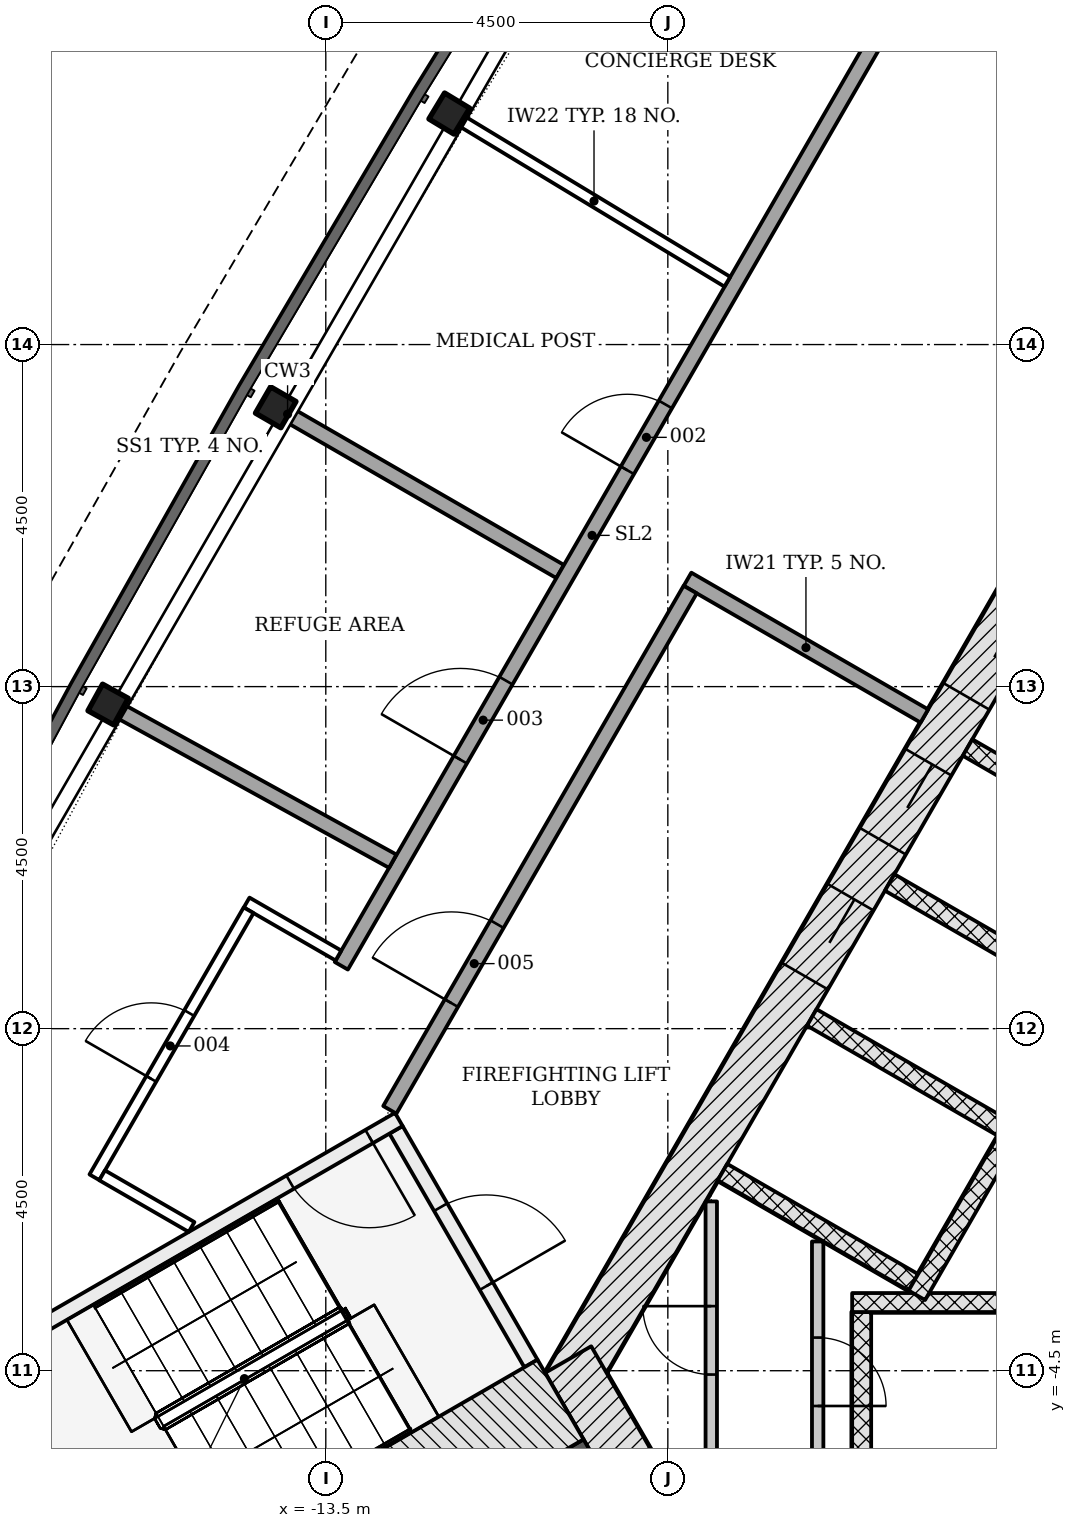
"""IFC4 building model, lengths in metres.
Left out: names, types, materials, properties, quantities, classifications, styles, units other than length and angle.
Written with IfcOpenShell. Run it as: python <this file> out.ifc"""

import sys

from ifc_helpers import new_model, si_unit, direction, frame, frame_2d, origin, origin_2d, place, context, subcontext, project, spatial, polyline, rectangle, i_section, outline, extrude, element, fill, save


model = new_model("IFC4")
c1 = context("Model", 3, precision=1e-05, world=origin(), true_north=direction((0.0, 1.0)))
c2 = subcontext(c1, "Body", "Model", "MODEL_VIEW")
j1 = project(units=[si_unit("LENGTHUNIT", "METRE"), si_unit("PLANEANGLEUNIT", "RADIAN")], contexts=[c1])
p1 = place(None, origin())
s1 = spatial("IfcSite", under=j1, at=p1, CompositionType="ELEMENT")
p2 = place(p1, origin())
s2 = spatial("IfcBuilding", under=s1, at=p2, CompositionType="ELEMENT")
p3 = place(p2, frame((0.0, 0.0, 134.7)))
s3 = spatial("IfcBuildingStorey", under=s2, at=p3, CompositionType="ELEMENT", Elevation=134.7)
p4 = place(p3, frame((-1.083, 11.281, -0.3), z_axis=(0.0, 0.0, 1.0), x_axis=(-0.500001446645, -0.866024568562, 0.0)))
e1 = element("IfcWall", 1, at=p4, inside=s3, PredefinedType="SHEAR", context=c2, shape_type="SweptSolid", body=[
    extrude(rectangle(XDim=18.458, YDim=0.7, at=frame_2d((9.229, 0.0))), origin(), (0.0, 0.0, 1.0), 5.5),
])
p5 = place(p4, frame((4.029, 0.0, 0.3)))
e2 = element("IfcOpeningElement", 2, at=p5, cuts=e1, PredefinedType="OPENING", context=c2, shape_type="SweptSolid", body=[
    extrude(rectangle(XDim=1.4, YDim=2.1, at=frame_2d((0.7, 1.05))), frame((0.0, 0.36, 0.0), z_axis=(0.0, -1.0, 0.0), x_axis=(1.0, 0.0, 0.0)), (0.0, 0.0, 1.0), 0.72),
])
p6 = place(p4, frame((6.579, 0.0, 0.3)))
e3 = element("IfcOpeningElement", 3, at=p6, cuts=e1, PredefinedType="OPENING", context=c2, shape_type="SweptSolid", body=[
    extrude(rectangle(XDim=1.4, YDim=2.1, at=frame_2d((0.7, 1.05))), frame((0.0, 0.36, 0.0), z_axis=(0.0, -1.0, 0.0), x_axis=(1.0, 0.0, 0.0)), (0.0, 0.0, 1.0), 0.72),
])
p7 = place(p4, frame((8.979, 0.0, 0.3)))
e4 = element("IfcOpeningElement", 4, at=p7, cuts=e1, PredefinedType="OPENING", context=c2, shape_type="SweptSolid", body=[
    extrude(rectangle(XDim=1.2, YDim=2.1, at=frame_2d((0.6, 1.05))), frame((0.0, 0.36, 0.0), z_axis=(0.0, -1.0, 0.0), x_axis=(1.0, 0.0, 0.0)), (0.0, 0.0, 1.0), 0.72),
])
p8 = place(p4, frame((11.029, 0.0, 0.3)))
e5 = element("IfcOpeningElement", 5, at=p8, cuts=e1, PredefinedType="OPENING", context=c2, shape_type="SweptSolid", body=[
    extrude(rectangle(XDim=1.2, YDim=2.1, at=frame_2d((0.6, 1.05))), frame((0.0, 0.36, 0.0), z_axis=(0.0, -1.0, 0.0), x_axis=(1.0, 0.0, 0.0)), (0.0, 0.0, 1.0), 0.72),
])
p9 = place(p3, frame((-10.311, -4.353, -0.3), z_axis=(0.0, 0.0, 1.0), x_axis=(0.500042739161, -0.866000726912, 0.0)))
e6 = element("IfcWall", 6, at=p9, inside=s3, PredefinedType="SHEAR", context=c2, shape_type="SweptSolid", body=[
    extrude(rectangle(XDim=2.771, YDim=0.7, at=frame_2d((1.386, 0.0))), origin(), (0.0, 0.0, 1.0), 5.5),
])
p10 = place(p3, frame((-9.922, -5.728, -0.3), z_axis=(0.0, 0.0, 1.0), x_axis=(-0.866024913782, -0.500000848707, 0.0)))
e7 = element("IfcWall", 7, at=p10, inside=s3, PredefinedType="SHEAR", context=c2, shape_type="SweptSolid", body=[
    extrude(rectangle(XDim=11.539, YDim=0.75, at=frame_2d((5.769, 0.0))), origin(), (0.0, 0.0, 1.0), 5.5),
])
for number, where, z_axis, x_axis in (
    (8, (-11.875, 12.039, -0.3), (0.0, 0.0, 1.0), (-0.517, -0.856, 0.0)),
    (9, (-14.159, 8.175, -0.3), (0.0, 0.0, 1.0), (-0.5, -0.866, 0.0)),
    (10, (-16.364, 4.265, -0.3), (0.0, 0.0, 1.0), (-0.482, -0.876, 0.0)),
):
    element("IfcColumn", number, at=place(p3, frame(where, z_axis=z_axis, x_axis=x_axis)), inside=s3, PredefinedType="COLUMN", context=c2, shape_type="SweptSolid", body=[
        extrude(i_section(OverallWidth=0.399, OverallDepth=0.386, WebThickness=0.021, FlangeThickness=0.033, FilletRadius=0.015, at=origin_2d()), origin(), (0.0, 0.0, 1.0), 5.5),
    ])
p11 = place(p3, frame((-6.45, -6.228, -0.3), z_axis=(0.0, 0.0, 1.0), x_axis=(0.0, 1.0, 0.0)))
e11 = element("IfcWall", 11, at=p11, inside=s3, PredefinedType="PARTITIONING", context=c2, shape_type="SweptSolid", body=[
    extrude(rectangle(XDim=2.5, YDim=0.25, at=frame_2d((1.25, 0.0))), origin(), (0.0, 0.0, 1.0), 5.5),
])
p12 = place(p3, frame((-6.575, -3.603, 0.0), z_axis=(0.0, 0.0, 1.0), x_axis=(1.0, 0.0, 0.0)))
e12 = element("IfcWall", 12, at=p12, inside=s3, PredefinedType="PARTITIONING", context=c2, shape_type="SweptSolid", body=[
    extrude(rectangle(XDim=13.15, YDim=0.25, at=frame_2d((6.575, 0.0))), origin(), (0.0, 0.0, 1.0), 5.2),
])
for number, where, z_axis, x_axis in (
    (13, (-5.056, 3.699, -0.3), (0.0, 0.0, 1.0), (0.866, -0.5, 0.0)),
    (14, (-6.081, 1.923, -0.3), (0.0, 0.0, 1.0), (0.866, -0.5, 0.0)),
    (15, (-7.106, 0.148, -0.3), (0.0, 0.0, 1.0), (0.866, -0.5, 0.0)),
    (16, (-8.281, -1.887, -0.3), (0.0, 0.0, 1.0), (0.866, -0.5, 0.0)),
):
    element("IfcWall", number, at=place(p3, frame(where, z_axis=z_axis, x_axis=x_axis)), inside=s3, PredefinedType="PARTITIONING", context=c2, shape_type="SweptSolid", body=[
        extrude(rectangle(XDim=2.9, YDim=0.25, at=frame_2d((1.45, 0.0))), origin(), (0.0, 0.0, 1.0), 5.5),
    ])
p13 = place(p3, frame((0.176, 6.711, 0.0), z_axis=(0.0, 0.0, 1.0), x_axis=(-0.500004227369, -0.866022963098, 0.0)))
e17 = element("IfcWall", 17, at=p13, inside=s3, PredefinedType="PARTITIONING", context=c2, shape_type="SweptSolid", body=[
    extrude(rectangle(XDim=11.8, YDim=0.25, at=frame_2d((5.9, 0.0))), origin(), (0.0, 0.0, 1.0), 5.2),
])
p14 = place(p3, frame((-8.429, -5.928, 0.0), z_axis=(0.0, 0.0, 1.0), x_axis=(0.0, 1.0, 0.0)))
e18 = element("IfcWall", 18, at=p14, inside=s3, PredefinedType="PARTITIONING", context=c2, shape_type="SweptSolid", body=[
    extrude(rectangle(XDim=3.656, YDim=0.15, at=frame_2d((1.828, 0.0))), origin(), (0.0, 0.0, 1.0), 5.2),
])
p15 = place(p14, frame((1.378, 0.0, 0.0)))
e19 = element("IfcOpeningElement", 19, at=p15, cuts=e18, PredefinedType="OPENING", context=c2, shape_type="SweptSolid", body=[
    extrude(rectangle(XDim=0.9, YDim=2.1, at=frame_2d((0.45, 1.05))), frame((0.0, 0.085, 0.0), z_axis=(0.0, -1.0, 0.0), x_axis=(1.0, 0.0, 0.0)), (0.0, 0.0, 1.0), 0.17),
])
p16 = place(p3, frame((-7.029, -2.8, 0.0), z_axis=(0.0, 0.0, 1.0), x_axis=(0.0, -1.0, 0.0)))
e20 = element("IfcWall", 20, at=p16, inside=s3, PredefinedType="PARTITIONING", context=c2, shape_type="SweptSolid", body=[
    extrude(rectangle(XDim=3.428, YDim=0.15, at=frame_2d((1.714, 0.0))), origin(), (0.0, 0.0, 1.0), 5.2),
])
p17 = place(p16, frame((1.264, 0.0, 0.0)))
e21 = element("IfcOpeningElement", 21, at=p17, cuts=e20, PredefinedType="OPENING", context=c2, shape_type="SweptSolid", body=[
    extrude(rectangle(XDim=0.9, YDim=2.1, at=frame_2d((0.45, 1.05))), frame((0.0, 0.085, 0.0), z_axis=(0.0, -1.0, 0.0), x_axis=(1.0, 0.0, 0.0)), (0.0, 0.0, 1.0), 0.17),
])
p18 = place(p3, frame((-12.576, -1.331, -0.3), z_axis=(0.0, 0.0, 1.0), x_axis=(0.499970499736, -0.8660424351, 0.0)))
e22 = element("IfcWall", 22, at=p18, inside=s3, PredefinedType="SHEAR", context=c2, shape_type="SweptSolid", body=[
    extrude(rectangle(XDim=3.55, YDim=0.2, at=frame_2d((1.775, 0.0))), origin(), (0.0, 0.0, 1.0), 5.5),
])
p19 = place(p18, frame((1.175, 0.0, 0.3)))
e23 = element("IfcOpeningElement", 23, at=p19, cuts=e22, PredefinedType="OPENING", context=c2, shape_type="SweptSolid", body=[
    extrude(rectangle(XDim=1.2, YDim=2.1, at=frame_2d((0.6, 1.05))), frame((0.0, 0.11, 0.0), z_axis=(0.0, -1.0, 0.0), x_axis=(1.0, 0.0, 0.0)), (0.0, 0.0, 1.0), 0.22),
])
p20 = place(p3, frame((-12.539, -1.194, -0.3), z_axis=(0.0, 0.0, 1.0), x_axis=(-0.866045472092, -0.499965239061, 0.0)))
e24 = element("IfcWall", 24, at=p20, inside=s3, PredefinedType="SHEAR", context=c2, shape_type="SweptSolid", body=[
    extrude(rectangle(XDim=5.6, YDim=0.2, at=frame_2d((2.8, 0.0))), origin(), (0.0, 0.0, 1.0), 5.5),
])
p21 = place(p20, frame((0.45, 0.0, 0.3)))
e25 = element("IfcOpeningElement", 25, at=p21, cuts=e24, PredefinedType="OPENING", context=c2, shape_type="SweptSolid", body=[
    extrude(rectangle(XDim=1.2, YDim=2.1, at=frame_2d((0.6, 1.05))), frame((0.0, 0.11, 0.0), z_axis=(0.0, -1.0, 0.0), x_axis=(1.0, 0.0, 0.0)), (0.0, 0.0, 1.0), 0.22),
])
p22 = place(p3, frame((-10.412, -4.879, -0.3), z_axis=(0.0, 0.0, 1.0), x_axis=(-0.866026919366, -0.499997374926, 0.0)))
e26 = element("IfcWall", 26, at=p22, inside=s3, PredefinedType="SHEAR", context=c2, shape_type="SweptSolid", body=[
    extrude(rectangle(XDim=7.2, YDim=1.211, at=frame_2d((3.6, 0.0))), origin(), (0.0, 0.0, 1.0), 5.5),
])
p23 = place(p3, frame((0.0, 0.0, -0.3)))
e27 = element("IfcWall", 27, at=p23, inside=s3, PredefinedType="SHEAR", context=c2, shape_type="SweptSolid", body=[
    extrude(outline(polyline([(-17.439, -3.907), (-18.025, -6.093), (-16.95, -7.955), (-16.777, -7.855), (-17.81, -6.065), (-17.267, -4.039), (-17.339, -4.081), (-17.339, -4.081), (-17.339, -4.081), (-17.339, -4.081), (-17.339, -4.081), (-17.339, -4.081), (-17.339, -4.081), (-17.339, -4.081), (-17.339, -4.081), (-17.339, -4.081), (-17.339, -4.081), (-17.339, -4.081), (-17.339, -4.081), (-17.339, -4.081), (-17.339, -4.081), (-17.339, -4.081), (-17.339, -4.081), (-17.439, -3.907)])), origin(), (0.0, 0.0, 1.0), 5.5),
])
p24 = place(p3, frame((-5.625, 4.114, 0.0), z_axis=(0.0, 0.0, 1.0), x_axis=(-0.866017220491, 0.500014173611, 0.0)))
e28 = element("IfcWall", 28, at=p24, inside=s3, PredefinedType="PARTITIONING", context=c2, shape_type="SweptSolid", body=[
    extrude(rectangle(XDim=3.598, YDim=0.2, at=frame_2d((1.799, 0.0))), origin(), (0.0, 0.0, 1.0), 5.2),
])
p25 = place(p3, frame((-12.658, -1.068, 0.0), z_axis=(0.0, 0.0, 1.0), x_axis=(0.499996073327, 0.866027670838, 0.0)))
e29 = element("IfcWall", 29, at=p25, inside=s3, PredefinedType="PARTITIONING", context=c2, shape_type="SweptSolid", body=[
    extrude(rectangle(XDim=7.904, YDim=0.2, at=frame_2d((3.952, 0.0))), origin(), (0.0, 0.0, 1.0), 4.647),
])
p26 = place(p25, frame((1.621, 0.0, 0.0)))
e30 = element("IfcOpeningElement", 30, at=p26, cuts=e29, PredefinedType="OPENING", context=c2, shape_type="SweptSolid", body=[
    extrude(rectangle(XDim=1.2, YDim=2.1, at=frame_2d((0.6, 1.05))), frame((0.0, 0.11, 0.0), z_axis=(0.0, -1.0, 0.0), x_axis=(1.0, 0.0, 0.0)), (0.0, 0.0, 1.0), 0.22),
])
p27 = place(p3, frame((-14.029, 8.1, 0.0), z_axis=(0.0, 0.0, 1.0), x_axis=(0.866022798998, -0.500004511595, 0.0)))
e31 = element("IfcWall", 31, at=p27, inside=s3, PredefinedType="PARTITIONING", context=c2, shape_type="SweptSolid", body=[
    extrude(rectangle(XDim=4.171, YDim=0.2, at=frame_2d((2.085, 0.0))), origin(), (0.0, 0.0, 1.0), 4.647),
])
p28 = place(p3, frame((-13.296, 0.827, 0.0), z_axis=(0.0, 0.0, 1.0), x_axis=(0.499999658466, 0.866025600969, 0.0)))
e32 = element("IfcWall", 32, at=p28, inside=s3, PredefinedType="PARTITIONING", context=c2, shape_type="SweptSolid", body=[
    extrude(rectangle(XDim=25.54, YDim=0.2, at=frame_2d((12.77, 0.0))), origin(), (0.0, 0.0, 1.0), 4.647),
])
p29 = place(p28, frame((17.363, 0.0, 0.0)))
e33 = element("IfcOpeningElement", 33, at=p29, cuts=e32, PredefinedType="OPENING", context=c2, shape_type="SweptSolid", body=[
    extrude(rectangle(XDim=1.0, YDim=2.1, at=frame_2d((0.5, 1.05))), frame((0.0, 0.11, 0.0), z_axis=(0.0, -1.0, 0.0), x_axis=(1.0, 0.0, 0.0)), (0.0, 0.0, 1.0), 0.22),
])
p30 = place(p28, frame((7.528, 0.0, 0.0)))
e34 = element("IfcOpeningElement", 34, at=p30, cuts=e32, PredefinedType="OPENING", context=c2, shape_type="SweptSolid", body=[
    extrude(rectangle(XDim=1.0, YDim=2.1, at=frame_2d((0.5, 1.05))), frame((0.0, 0.11, 0.0), z_axis=(0.0, -1.0, 0.0), x_axis=(1.0, 0.0, 0.0)), (0.0, 0.0, 1.0), 0.22),
])
p31 = place(p28, frame((3.132, 0.0, 0.0)))
e35 = element("IfcOpeningElement", 35, at=p31, cuts=e32, PredefinedType="OPENING", context=c2, shape_type="SweptSolid", body=[
    extrude(rectangle(XDim=1.2, YDim=2.1, at=frame_2d((0.6, 1.05))), frame((0.0, 0.11, 0.0), z_axis=(0.0, -1.0, 0.0), x_axis=(1.0, 0.0, 0.0)), (0.0, 0.0, 1.0), 0.22),
])
p32 = place(p3, frame((-16.232, 4.192, 0.0), z_axis=(0.0, 0.0, 1.0), x_axis=(0.876013353415, -0.482286848917, 0.0)))
e36 = element("IfcWall", 36, at=p32, inside=s3, PredefinedType="PARTITIONING", context=c2, shape_type="SweptSolid", body=[
    extrude(rectangle(XDim=4.124, YDim=0.2, at=frame_2d((2.062, 0.0))), origin(), (0.0, 0.0, 1.0), 4.647),
])
p33 = place(p3, frame((-11.725, 11.948, 0.0), z_axis=(0.0, 0.0, 1.0), x_axis=(0.85568537719, -0.517496410869, 0.0)))
e37 = element("IfcWall", 37, at=p33, inside=s3, PredefinedType="PARTITIONING", context=c2, shape_type="SweptSolid", body=[
    extrude(rectangle(XDim=4.1, YDim=0.15, at=frame_2d((2.05, 0.0))), origin(), (0.0, 0.0, 1.0), 4.647),
])
p34 = place(p3, frame((-13.333, 0.962, 0.0), z_axis=(0.0, 0.0, 1.0), x_axis=(-0.865961103467, 0.500111354883, 0.0)))
e38 = element("IfcWall", 38, at=p34, inside=s3, PredefinedType="PARTITIONING", context=c2, shape_type="SweptSolid", body=[
    extrude(rectangle(XDim=1.395, YDim=0.15, at=frame_2d((0.697, 0.0))), origin(), (0.0, 0.0, 1.0), 5.2),
])
p35 = place(p3, frame((-16.544, -1.955, 0.0), z_axis=(0.0, 0.0, 1.0), x_axis=(0.499996823547, 0.866027237703, 0.0)))
e39 = element("IfcWall", 39, at=p35, inside=s3, PredefinedType="PARTITIONING", context=c2, shape_type="SweptSolid", body=[
    extrude(rectangle(XDim=4.057, YDim=0.15, at=frame_2d((2.028, 0.0))), origin(), (0.0, 0.0, 1.0), 4.723),
])
p36 = place(p35, frame((1.495, 0.0, 0.0)))
e40 = element("IfcOpeningElement", 40, at=p36, cuts=e39, PredefinedType="OPENING", context=c2, shape_type="SweptSolid", body=[
    extrude(rectangle(XDim=1.0, YDim=2.1, at=frame_2d((0.5, 1.05))), frame((0.0, 0.085, 0.0), z_axis=(0.0, -1.0, 0.0), x_axis=(1.0, 0.0, 0.0)), (0.0, 0.0, 1.0), 0.17),
])
p37 = place(p3, frame((-16.443, -1.93, 0.0), z_axis=(0.0, 0.0, 1.0), x_axis=(0.866056956396, -0.499945345291, 0.0)))
e41 = element("IfcWall", 41, at=p37, inside=s3, PredefinedType="PARTITIONING", context=c2, shape_type="SweptSolid", body=[
    extrude(rectangle(XDim=1.359, YDim=0.15, at=frame_2d((0.68, 0.0))), origin(), (0.0, 0.0, 1.0), 5.2),
])
p38 = place(p6, origin())
e42 = element("IfcDoor", 42, at=p38, inside=s3, OperationType="DOUBLE_DOOR_SLIDING", PredefinedType="DOOR", context=c2, shape_type="SweptSolid", body=[
    extrude(rectangle(XDim=1.4, YDim=2.1, at=frame_2d((0.7, 1.05))), frame((0.0, 0.025, 0.0), z_axis=(0.0, -1.0, 0.0), x_axis=(1.0, 0.0, 0.0)), (0.0, 0.0, 1.0), 0.05),
])
fill(e3, e42)
p39 = place(p7, origin())
e43 = element("IfcDoor", 43, at=p39, inside=s3, OperationType="DOUBLE_DOOR_SLIDING", PredefinedType="DOOR", context=c2, shape_type="SweptSolid", body=[
    extrude(rectangle(XDim=1.2, YDim=2.1, at=frame_2d((0.6, 1.05))), frame((0.0, 0.025, 0.0), z_axis=(0.0, -1.0, 0.0), x_axis=(1.0, 0.0, 0.0)), (0.0, 0.0, 1.0), 0.05),
])
fill(e4, e43)
p40 = place(p8, origin())
e44 = element("IfcDoor", 44, at=p40, inside=s3, OperationType="DOUBLE_DOOR_SLIDING", PredefinedType="DOOR", context=c2, shape_type="SweptSolid", body=[
    extrude(rectangle(XDim=1.2, YDim=2.1, at=frame_2d((0.6, 1.05))), frame((0.0, 0.025, 0.0), z_axis=(0.0, -1.0, 0.0), x_axis=(1.0, 0.0, 0.0)), (0.0, 0.0, 1.0), 0.05),
])
fill(e5, e44)
p41 = place(p15, origin())
e45 = element("IfcDoor", 45, at=p41, inside=s3, OperationType="SINGLE_SWING_RIGHT", PredefinedType="DOOR", context=c2, shape_type="SweptSolid", body=[
    extrude(rectangle(XDim=0.9, YDim=2.1, at=frame_2d((0.45, 1.05))), frame((0.0, 0.025, 0.0), z_axis=(0.0, -1.0, 0.0), x_axis=(1.0, 0.0, 0.0)), (0.0, 0.0, 1.0), 0.05),
])
fill(e19, e45)
p42 = place(p17, origin())
e46 = element("IfcDoor", 46, at=p42, inside=s3, OperationType="SINGLE_SWING_RIGHT", PredefinedType="DOOR", context=c2, shape_type="SweptSolid", body=[
    extrude(rectangle(XDim=0.9, YDim=2.1, at=frame_2d((0.45, 1.05))), frame((0.0, 0.025, 0.0), z_axis=(0.0, -1.0, 0.0), x_axis=(1.0, 0.0, 0.0)), (0.0, 0.0, 1.0), 0.05),
])
fill(e21, e46)
p43 = place(p19, origin())
e47 = element("IfcDoor", 47, at=p43, inside=s3, OperationType="SINGLE_SWING_RIGHT", PredefinedType="DOOR", context=c2, shape_type="SweptSolid", body=[
    extrude(rectangle(XDim=1.2, YDim=2.1, at=frame_2d((0.6, 1.05))), frame((0.0, 0.025, 0.0), z_axis=(0.0, -1.0, 0.0), x_axis=(1.0, 0.0, 0.0)), (0.0, 0.0, 1.0), 0.05),
])
fill(e23, e47)
p44 = place(p21, origin())
e48 = element("IfcDoor", 48, at=p44, inside=s3, OperationType="SINGLE_SWING_LEFT", PredefinedType="DOOR", context=c2, shape_type="SweptSolid", body=[
    extrude(rectangle(XDim=1.2, YDim=2.1, at=frame_2d((0.6, 1.05))), frame((0.0, 0.025, 0.0), z_axis=(0.0, -1.0, 0.0), x_axis=(1.0, 0.0, 0.0)), (0.0, 0.0, 1.0), 0.05),
])
fill(e25, e48)
p45 = place(p30, origin())
e49 = element("IfcDoor", 49, at=p45, inside=s3, OperationType="SINGLE_SWING_LEFT", PredefinedType="DOOR", context=c2, shape_type="SweptSolid", body=[
    extrude(rectangle(XDim=1.0, YDim=2.1, at=frame_2d((0.5, 1.05))), frame((0.0, 0.025, 0.0), z_axis=(0.0, -1.0, 0.0), x_axis=(1.0, 0.0, 0.0)), (0.0, 0.0, 1.0), 0.05),
])
fill(e34, e49)
p46 = place(p31, origin())
e50 = element("IfcDoor", 50, at=p46, inside=s3, OperationType="SINGLE_SWING_LEFT", PredefinedType="DOOR", context=c2, shape_type="SweptSolid", body=[
    extrude(rectangle(XDim=1.2, YDim=2.1, at=frame_2d((0.6, 1.05))), frame((0.0, 0.025, 0.0), z_axis=(0.0, -1.0, 0.0), x_axis=(1.0, 0.0, 0.0)), (0.0, 0.0, 1.0), 0.05),
])
fill(e35, e50)
p47 = place(p36, origin())
e51 = element("IfcDoor", 51, at=p47, inside=s3, OperationType="SINGLE_SWING_LEFT", PredefinedType="DOOR", context=c2, shape_type="SweptSolid", body=[
    extrude(rectangle(XDim=1.0, YDim=2.1, at=frame_2d((0.5, 1.05))), frame((0.0, 0.025, 0.0), z_axis=(0.0, -1.0, 0.0), x_axis=(1.0, 0.0, 0.0)), (0.0, 0.0, 1.0), 0.05),
])
fill(e40, e51)
p48 = place(p26, origin())
e52 = element("IfcDoor", 52, at=p48, inside=s3, OperationType="SINGLE_SWING_LEFT", PredefinedType="DOOR", context=c2, shape_type="SweptSolid", body=[
    extrude(rectangle(XDim=1.2, YDim=2.1, at=frame_2d((0.6, 1.05))), frame((0.0, 0.025, 0.0), z_axis=(0.0, -1.0, 0.0), x_axis=(1.0, 0.0, 0.0)), (0.0, 0.0, 1.0), 0.05),
])
fill(e30, e52)
save(model, sys.argv[1])
